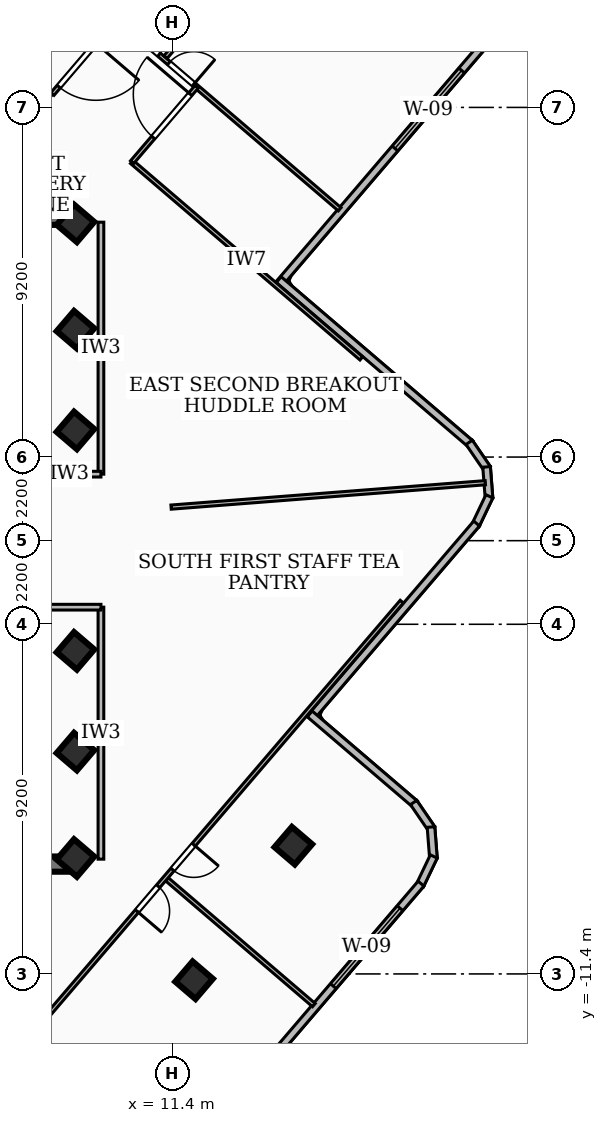
"""IFC4 building model, lengths in metres.
Left out: names, types, materials, properties, quantities, classifications, styles, units other than length and angle.
Written with IfcOpenShell. Run it as: python <this file> out.ifc"""

import sys

from ifc_helpers import new_model, si_unit, direction, frame, frame_2d, origin, origin_2d, place, context, subcontext, project, spatial, rectangle, extrude, element, fill, save


model = new_model("IFC4")
c1 = context("Model", 3, precision=1e-05, world=origin(), true_north=direction((0.0, 1.0)))
c2 = subcontext(c1, "Body", "Model", "MODEL_VIEW")
j1 = project(units=[si_unit("LENGTHUNIT", "METRE"), si_unit("PLANEANGLEUNIT", "RADIAN")], contexts=[c1])
p1 = place(None, origin())
s1 = spatial("IfcSite", under=j1, at=p1, CompositionType="ELEMENT")
p2 = place(p1, origin())
s2 = spatial("IfcBuilding", under=s1, at=p2, CompositionType="ELEMENT")
p3 = place(p2, frame((0.0, 0.0, 254.34)))
s3 = spatial("IfcBuildingStorey", under=s2, at=p3, CompositionType="ELEMENT", Elevation=254.34)
for number, where, z_axis, x_axis in (
    (1, (-8.78, 8.51, 0.0), (0.0, 0.0, 1.0), (1.0, 0.0, 0.0)),
    (2, (8.78, -8.51, 0.0), (0.0, 0.0, 1.0), (-1.0, 0.0, 0.0)),
):
    element("IfcWall", number, at=place(p3, frame(where, z_axis=z_axis, x_axis=x_axis)), inside=s3, PredefinedType="SHEAR", context=c2, shape_type="SweptSolid", body=[
        extrude(rectangle(XDim=17.56, YDim=0.4, at=frame_2d((8.78, 0.0))), origin(), (0.0, 0.0, 1.0), 3.16),
    ])
for number, where, z_axis, x_axis in (
    (3, (8.85, -5.55, 0.0), (0.0, 0.0, 1.0), (0.65, 0.76, 0.0)),
    (4, (8.85, -2.9, 0.0), (0.0, 0.0, 1.0), (0.65, 0.76, 0.0)),
    (5, (8.85, 2.9, 0.0), (0.0, 0.0, 1.0), (0.65, 0.76, 0.0)),
    (6, (8.85, 5.55, 0.0), (0.0, 0.0, 1.0), (0.65, 0.76, 0.0)),
    (7, (8.85, -8.35, 0.0), (0.0, 0.0, 1.0), (0.65, 0.76, 0.0)),
    (8, (8.85, 8.35, 0.0), (0.0, 0.0, 1.0), (0.65, 0.76, 0.0)),
    (9, (11.971, -11.566, 0.0), (0.0, 0.0, 1.0), (0.65, 0.76, 0.0)),
    (10, (14.583, -8.026, 0.0), (0.0, 0.0, 1.0), (0.65, 0.76, 0.0)),
):
    element("IfcColumn", number, at=place(p3, frame(where, z_axis=z_axis, x_axis=x_axis)), inside=s3, PredefinedType="COLUMN", context=c2, shape_type="SweptSolid", body=[
        extrude(rectangle(XDim=0.7, YDim=0.7, at=origin_2d()), origin(), (0.0, 0.0, 1.0), 3.42),
    ])
p4 = place(p3, frame((19.565, 13.017, 0.0), z_axis=(0.0, 0.0, 1.0), x_axis=(-0.650112914542, -0.759837613142, 0.0)))
e11 = element("IfcWall", 11, at=p4, inside=s3, PredefinedType="SOLIDWALL", context=c2, shape_type="SweptSolid", body=[
    extrude(rectangle(XDim=8.241, YDim=0.2, at=frame_2d((4.121, 0.0))), origin(), (0.0, 0.0, 1.0), 3.16),
])
p5 = place(p4, frame((0.85, 0.0, 0.85)))
e12 = element("IfcOpeningElement", 12, at=p5, cuts=e11, PredefinedType="OPENING", context=c2, shape_type="SweptSolid", body=[
    extrude(rectangle(XDim=2.7, YDim=1.65, at=frame_2d((1.35, 0.825))), frame((0.0, 0.11, 0.0), z_axis=(0.0, -1.0, 0.0), x_axis=(1.0, 0.0, 0.0)), (0.0, 0.0, 1.0), 0.22),
])
p6 = place(p3, frame((14.198, 6.868, 0.0), z_axis=(0.0, 0.0, 1.0), x_axis=(0.759728734939, -0.650240147413, 0.0)))
e13 = element("IfcWall", 13, at=p6, inside=s3, PredefinedType="SOLIDWALL", context=c2, shape_type="SweptSolid", body=[
    extrude(rectangle(XDim=6.64, YDim=0.2, at=frame_2d((3.32, 0.0))), origin(), (0.0, 0.0, 1.0), 3.16),
])
p7 = place(p3, frame((19.21, 2.587, 0.0), z_axis=(0.0, 0.0, 1.0), x_axis=(0.565268121329, -0.824907237821, 0.0)))
e14 = element("IfcWall", 14, at=p7, inside=s3, PredefinedType="SOLIDWALL", context=c2, shape_type="SweptSolid", body=[
    extrude(rectangle(XDim=0.839, YDim=0.2, at=frame_2d((0.419, 0.0))), origin(), (0.0, 0.0, 1.0), 3.16),
])
p8 = place(p3, frame((19.668, 1.941, 0.0), z_axis=(0.0, 0.0, 1.0), x_axis=(0.077579558977, -0.996986164412, 0.0)))
e15 = element("IfcWall", 15, at=p8, inside=s3, PredefinedType="SOLIDWALL", context=c2, shape_type="SweptSolid", body=[
    extrude(rectangle(XDim=0.824, YDim=0.2, at=frame_2d((0.412, 0.0))), origin(), (0.0, 0.0, 1.0), 3.16),
])
p9 = place(p3, frame((19.741, 1.167, 0.0), z_axis=(0.0, 0.0, 1.0), x_axis=(-0.430982405796, -0.902360330408, 0.0)))
e16 = element("IfcWall", 16, at=p9, inside=s3, PredefinedType="SOLIDWALL", context=c2, shape_type="SweptSolid", body=[
    extrude(rectangle(XDim=0.84, YDim=0.2, at=frame_2d((0.42, 0.0))), origin(), (0.0, 0.0, 1.0), 3.16),
])
p10 = place(p3, frame((19.406, 0.451, 0.0), z_axis=(0.0, 0.0, 1.0), x_axis=(-0.650185720357, -0.759775314842, 0.0)))
e17 = element("IfcWall", 17, at=p10, inside=s3, PredefinedType="SOLIDWALL", context=c2, shape_type="SweptSolid", body=[
    extrude(rectangle(XDim=6.741, YDim=0.2, at=frame_2d((3.371, 0.0))), origin(), (0.0, 0.0, 1.0), 3.16),
])
p11 = place(p3, frame((15.014, -4.558, 0.0), z_axis=(0.0, 0.0, 1.0), x_axis=(0.759781598798, -0.650178377161, 0.0)))
e18 = element("IfcWall", 18, at=p11, inside=s3, PredefinedType="SOLIDWALL", context=c2, shape_type="SweptSolid", body=[
    extrude(rectangle(XDim=3.642, YDim=0.2, at=frame_2d((1.821, 0.0))), origin(), (0.0, 0.0, 1.0), 3.16),
])
p12 = place(p3, frame((17.748, -6.889, 0.0), z_axis=(0.0, 0.0, 1.0), x_axis=(0.564140869434, -0.825678556967, 0.0)))
e19 = element("IfcWall", 19, at=p12, inside=s3, PredefinedType="SOLIDWALL", context=c2, shape_type="SweptSolid", body=[
    extrude(rectangle(XDim=0.838, YDim=0.2, at=frame_2d((0.419, 0.0))), origin(), (0.0, 0.0, 1.0), 3.16),
])
p13 = place(p3, frame((18.205, -7.535, 0.0), z_axis=(0.0, 0.0, 1.0), x_axis=(0.077579558977, -0.996986164412, 0.0)))
e20 = element("IfcWall", 20, at=p13, inside=s3, PredefinedType="SOLIDWALL", context=c2, shape_type="SweptSolid", body=[
    extrude(rectangle(XDim=0.824, YDim=0.2, at=frame_2d((0.412, 0.0))), origin(), (0.0, 0.0, 1.0), 3.16),
])
p14 = place(p3, frame((18.278, -8.309, 0.0), z_axis=(0.0, 0.0, 1.0), x_axis=(-0.431548166297, -0.902089895834, 0.0)))
e21 = element("IfcWall", 21, at=p14, inside=s3, PredefinedType="SOLIDWALL", context=c2, shape_type="SweptSolid", body=[
    extrude(rectangle(XDim=0.839, YDim=0.2, at=frame_2d((0.419, 0.0))), origin(), (0.0, 0.0, 1.0), 3.16),
])
p15 = place(p3, frame((17.943, -9.024, 0.0), z_axis=(0.0, 0.0, 1.0), x_axis=(-0.650218389303, -0.759747356831, 0.0)))
e22 = element("IfcWall", 22, at=p15, inside=s3, PredefinedType="SOLIDWALL", context=c2, shape_type="SweptSolid", body=[
    extrude(rectangle(XDim=9.723, YDim=0.2, at=frame_2d((4.861, 0.0))), origin(), (0.0, 0.0, 1.0), 3.16),
])
p16 = place(p15, frame((0.85, 0.0, 0.85)))
e23 = element("IfcOpeningElement", 23, at=p16, cuts=e22, PredefinedType="OPENING", context=c2, shape_type="SweptSolid", body=[
    extrude(rectangle(XDim=2.7, YDim=1.65, at=frame_2d((1.35, 0.825))), frame((0.0, 0.11, 0.0), z_axis=(0.0, -1.0, 0.0), x_axis=(1.0, 0.0, 0.0)), (0.0, 0.0, 1.0), 0.22),
])
p17 = place(p3, frame((9.52, 1.75, 0.0), z_axis=(0.0, 0.0, 1.0), x_axis=(0.0, 1.0, 0.0)))
e24 = element("IfcWall", 24, at=p17, inside=s3, PredefinedType="PARTITIONING", context=c2, shape_type="SweptSolid", body=[
    extrude(rectangle(XDim=6.63, YDim=0.15, at=frame_2d((3.315, 0.0))), origin(), (0.0, 0.0, 1.0), 3.16),
])
p18 = place(p3, frame((7.85, 1.75, 0.0), z_axis=(0.0, 0.0, 1.0), x_axis=(1.0, 0.0, 0.0)))
e25 = element("IfcWall", 25, at=p18, inside=s3, PredefinedType="PARTITIONING", context=c2, shape_type="SweptSolid", body=[
    extrude(rectangle(XDim=1.67, YDim=0.15, at=frame_2d((0.835, 0.0))), origin(), (0.0, 0.0, 1.0), 2.39),
])
p19 = place(p3, frame((9.52, -8.38, 0.0), z_axis=(0.0, 0.0, 1.0), x_axis=(0.0, 1.0, 0.0)))
e26 = element("IfcWall", 26, at=p19, inside=s3, PredefinedType="PARTITIONING", context=c2, shape_type="SweptSolid", body=[
    extrude(rectangle(XDim=6.63, YDim=0.15, at=frame_2d((3.315, 0.0))), origin(), (0.0, 0.0, 1.0), 2.53),
])
p20 = place(p3, frame((7.85, -1.75, 0.0), z_axis=(0.0, 0.0, 1.0), x_axis=(1.0, 0.0, 0.0)))
e27 = element("IfcWall", 27, at=p20, inside=s3, PredefinedType="PARTITIONING", context=c2, shape_type="SweptSolid", body=[
    extrude(rectangle(XDim=1.67, YDim=0.15, at=frame_2d((0.835, 0.0))), origin(), (0.0, 0.0, 1.0), 2.39),
])
p21 = place(p3, frame((11.366, 0.883, 0.0), z_axis=(0.0, 0.0, 1.0), x_axis=(0.997001087863, 0.077387536463, 0.0)))
e28 = element("IfcWall", 28, at=p21, inside=s3, PredefinedType="PARTITIONING", context=c2, shape_type="SweptSolid", body=[
    extrude(rectangle(XDim=8.294, YDim=0.11, at=frame_2d((4.147, 0.0))), origin(), (0.0, 0.0, 1.0), 3.16),
])
p22 = place(p3, frame((8.251, 11.747, 0.0), z_axis=(0.0, 0.0, 1.0), x_axis=(-0.759658945325, 0.650321679469, 0.0)))
e29 = element("IfcWall", 29, at=p22, inside=s3, PredefinedType="PARTITIONING", context=c2, shape_type="SweptSolid", body=[
    extrude(rectangle(XDim=8.05, YDim=0.11, at=frame_2d((4.025, 0.0))), origin(), (0.0, 0.0, 1.0), 3.16),
])
p23 = place(p3, frame((16.372, 4.796, 0.0), z_axis=(0.0, 0.0, 1.0), x_axis=(-0.759640163548, 0.650343618348, 0.0)))
e30 = element("IfcWall", 30, at=p23, inside=s3, PredefinedType="PARTITIONING", context=c2, shape_type="SweptSolid", body=[
    extrude(rectangle(XDim=7.95, YDim=0.11, at=frame_2d((3.975, 0.0))), origin(), (0.0, 0.0, 1.0), 2.53),
])
p24 = place(p3, frame((9.941, 13.737, 0.0), z_axis=(0.0, 0.0, 1.0), x_axis=(-0.65016721503, -0.759791150581, 0.0)))
e31 = element("IfcWall", 31, at=p24, inside=s3, PredefinedType="PARTITIONING", context=c2, shape_type="SweptSolid", body=[
    extrude(rectangle(XDim=2.61, YDim=0.11, at=frame_2d((1.305, 0.0))), origin(), (0.0, 0.0, 1.0), 2.53),
])
p25 = place(p24, frame((0.855, 0.0, 0.0)))
e32 = element("IfcOpeningElement", 32, at=p25, cuts=e31, PredefinedType="OPENING", context=c2, shape_type="SweptSolid", body=[
    extrude(rectangle(XDim=1.5, YDim=2.12, at=frame_2d((0.75, 1.06))), frame((0.0, 0.065, 0.0), z_axis=(0.0, -1.0, 0.0), x_axis=(1.0, 0.0, 0.0)), (0.0, 0.0, 1.0), 0.13),
])
p26 = place(p3, frame((10.34, 9.959, 0.0), z_axis=(0.0, 0.0, 1.0), x_axis=(0.650429323352, 0.759566781346, 0.0)))
e33 = element("IfcWall", 33, at=p26, inside=s3, PredefinedType="PARTITIONING", context=c2, shape_type="SweptSolid", body=[
    extrude(rectangle(XDim=2.611, YDim=0.11, at=frame_2d((1.305, 0.0))), origin(), (0.0, 0.0, 1.0), 2.53),
])
p27 = place(p26, frame((0.855, 0.0, 0.0)))
e34 = element("IfcOpeningElement", 34, at=p27, cuts=e33, PredefinedType="OPENING", context=c2, shape_type="SweptSolid", body=[
    extrude(rectangle(XDim=1.5, YDim=2.12, at=frame_2d((0.75, 1.06))), frame((0.0, 0.065, 0.0), z_axis=(0.0, -1.0, 0.0), x_axis=(1.0, 0.0, 0.0)), (0.0, 0.0, 1.0), 0.13),
])
p28 = place(p3, frame((11.218, 12.722, 0.0), z_axis=(0.0, 0.0, 1.0), x_axis=(0.650148936059, 0.75980679185, 0.0)))
e35 = element("IfcWall", 35, at=p28, inside=s3, PredefinedType="PARTITIONING", context=c2, shape_type="SweptSolid", body=[
    extrude(rectangle(XDim=7.075, YDim=0.11, at=frame_2d((3.538, 0.0))), origin(), (0.0, 0.0, 1.0), 3.16),
])
p29 = place(p3, frame((6.252, 16.894, 0.0), z_axis=(0.0, 0.0, 1.0), x_axis=(0.759715677597, -0.650255403063, 0.0)))
e36 = element("IfcWall", 36, at=p29, inside=s3, PredefinedType="PARTITIONING", context=c2, shape_type="SweptSolid", body=[
    extrude(rectangle(XDim=12.571, YDim=0.11, at=frame_2d((6.285, 0.0))), origin(), (0.0, 0.0, 1.0), 2.53),
])
p30 = place(p29, frame((6.655, 0.0, 0.0)))
e37 = element("IfcOpeningElement", 37, at=p30, cuts=e36, PredefinedType="OPENING", context=c2, shape_type="SweptSolid", body=[
    extrude(rectangle(XDim=0.86, YDim=2.04, at=frame_2d((0.43, 1.02))), frame((0.0, 0.065, 0.0), z_axis=(0.0, -1.0, 0.0), x_axis=(1.0, 0.0, 0.0)), (0.0, 0.0, 1.0), 0.13),
])
p31 = place(p29, frame((5.455, 0.0, 0.0)))
e38 = element("IfcOpeningElement", 38, at=p31, cuts=e36, PredefinedType="OPENING", context=c2, shape_type="SweptSolid", body=[
    extrude(rectangle(XDim=0.86, YDim=2.04, at=frame_2d((0.43, 1.02))), frame((0.0, 0.065, 0.0), z_axis=(0.0, -1.0, 0.0), x_axis=(1.0, 0.0, 0.0)), (0.0, 0.0, 1.0), 0.13),
])
p32 = place(p3, frame((11.26, -8.913, 0.0), z_axis=(0.0, 0.0, 1.0), x_axis=(0.759673292451, -0.650304919816, 0.0)))
e39 = element("IfcWall", 39, at=p32, inside=s3, PredefinedType="PARTITIONING", context=c2, shape_type="SweptSolid", body=[
    extrude(rectangle(XDim=5.085, YDim=0.11, at=frame_2d((2.542, 0.0))), origin(), (0.0, 0.0, 1.0), 3.16),
])
p33 = place(p3, frame((17.437, -1.604, 0.0), z_axis=(0.0, 0.0, 1.0), x_axis=(-0.650265099033, -0.759707378522, 0.0)))
e40 = element("IfcWall", 40, at=p33, inside=s3, PredefinedType="PARTITIONING", context=c2, shape_type="SweptSolid", body=[
    extrude(rectangle(XDim=20.139, YDim=0.11, at=frame_2d((10.07, 0.0))), origin(), (0.0, 0.0, 1.0), 2.53),
])
p34 = place(p33, frame((9.859, 0.0, 0.0)))
e41 = element("IfcOpeningElement", 41, at=p34, cuts=e40, PredefinedType="OPENING", context=c2, shape_type="SweptSolid", body=[
    extrude(rectangle(XDim=0.86, YDim=2.04, at=frame_2d((0.43, 1.02))), frame((0.0, 0.065, 0.0), z_axis=(0.0, -1.0, 0.0), x_axis=(1.0, 0.0, 0.0)), (0.0, 0.0, 1.0), 0.13),
])
p35 = place(p33, frame((8.419, 0.0, 0.0)))
e42 = element("IfcOpeningElement", 42, at=p35, cuts=e40, PredefinedType="OPENING", context=c2, shape_type="SweptSolid", body=[
    extrude(rectangle(XDim=0.86, YDim=2.04, at=frame_2d((0.43, 1.02))), frame((0.0, 0.065, 0.0), z_axis=(0.0, -1.0, 0.0), x_axis=(1.0, 0.0, 0.0)), (0.0, 0.0, 1.0), 0.13),
])
p36 = place(p5, origin())
e43 = element("IfcWindow", 43, at=p36, inside=s3, PartitioningType="SINGLE_PANEL", PredefinedType="WINDOW", context=c2, shape_type="SweptSolid", body=[
    extrude(rectangle(XDim=2.7, YDim=1.65, at=frame_2d((1.35, 0.825))), frame((0.0, 0.03, 0.0), z_axis=(0.0, -1.0, 0.0), x_axis=(1.0, 0.0, 0.0)), (0.0, 0.0, 1.0), 0.06),
])
fill(e12, e43)
p37 = place(p16, origin())
e44 = element("IfcWindow", 44, at=p37, inside=s3, PartitioningType="SINGLE_PANEL", PredefinedType="WINDOW", context=c2, shape_type="SweptSolid", body=[
    extrude(rectangle(XDim=2.7, YDim=1.65, at=frame_2d((1.35, 0.825))), frame((0.0, 0.03, 0.0), z_axis=(0.0, -1.0, 0.0), x_axis=(1.0, 0.0, 0.0)), (0.0, 0.0, 1.0), 0.06),
])
fill(e23, e44)
p38 = place(p25, origin())
e45 = element("IfcDoor", 45, at=p38, inside=s3, OperationType="SINGLE_SWING_LEFT", PredefinedType="DOOR", context=c2, shape_type="SweptSolid", body=[
    extrude(rectangle(XDim=1.5, YDim=2.12, at=frame_2d((0.75, 1.06))), frame((0.0, 0.025, 0.0), z_axis=(0.0, -1.0, 0.0), x_axis=(1.0, 0.0, 0.0)), (0.0, 0.0, 1.0), 0.05),
])
fill(e32, e45)
p39 = place(p27, origin())
e46 = element("IfcDoor", 46, at=p39, inside=s3, OperationType="SINGLE_SWING_RIGHT", PredefinedType="DOOR", context=c2, shape_type="SweptSolid", body=[
    extrude(rectangle(XDim=1.5, YDim=2.12, at=frame_2d((0.75, 1.06))), frame((0.0, 0.025, 0.0), z_axis=(0.0, -1.0, 0.0), x_axis=(1.0, 0.0, 0.0)), (0.0, 0.0, 1.0), 0.05),
])
fill(e34, e46)
p40 = place(p30, origin())
e47 = element("IfcDoor", 47, at=p40, inside=s3, OperationType="SINGLE_SWING_RIGHT", PredefinedType="DOOR", context=c2, shape_type="SweptSolid", body=[
    extrude(rectangle(XDim=0.86, YDim=2.04, at=frame_2d((0.43, 1.02))), frame((0.0, 0.025, 0.0), z_axis=(0.0, -1.0, 0.0), x_axis=(1.0, 0.0, 0.0)), (0.0, 0.0, 1.0), 0.05),
])
fill(e37, e47)
p41 = place(p31, origin())
e48 = element("IfcDoor", 48, at=p41, inside=s3, OperationType="SINGLE_SWING_LEFT", PredefinedType="DOOR", context=c2, shape_type="SweptSolid", body=[
    extrude(rectangle(XDim=0.86, YDim=2.04, at=frame_2d((0.43, 1.02))), frame((0.0, 0.025, 0.0), z_axis=(0.0, -1.0, 0.0), x_axis=(1.0, 0.0, 0.0)), (0.0, 0.0, 1.0), 0.05),
])
fill(e38, e48)
p42 = place(p34, origin())
e49 = element("IfcDoor", 49, at=p42, inside=s3, OperationType="SINGLE_SWING_RIGHT", PredefinedType="DOOR", context=c2, shape_type="SweptSolid", body=[
    extrude(rectangle(XDim=0.86, YDim=2.04, at=frame_2d((0.43, 1.02))), frame((0.0, 0.025, 0.0), z_axis=(0.0, -1.0, 0.0), x_axis=(1.0, 0.0, 0.0)), (0.0, 0.0, 1.0), 0.05),
])
fill(e41, e49)
p43 = place(p35, origin())
e50 = element("IfcDoor", 50, at=p43, inside=s3, OperationType="SINGLE_SWING_LEFT", PredefinedType="DOOR", context=c2, shape_type="SweptSolid", body=[
    extrude(rectangle(XDim=0.86, YDim=2.04, at=frame_2d((0.43, 1.02))), frame((0.0, 0.025, 0.0), z_axis=(0.0, -1.0, 0.0), x_axis=(1.0, 0.0, 0.0)), (0.0, 0.0, 1.0), 0.05),
])
fill(e42, e50)
save(model, sys.argv[1])
